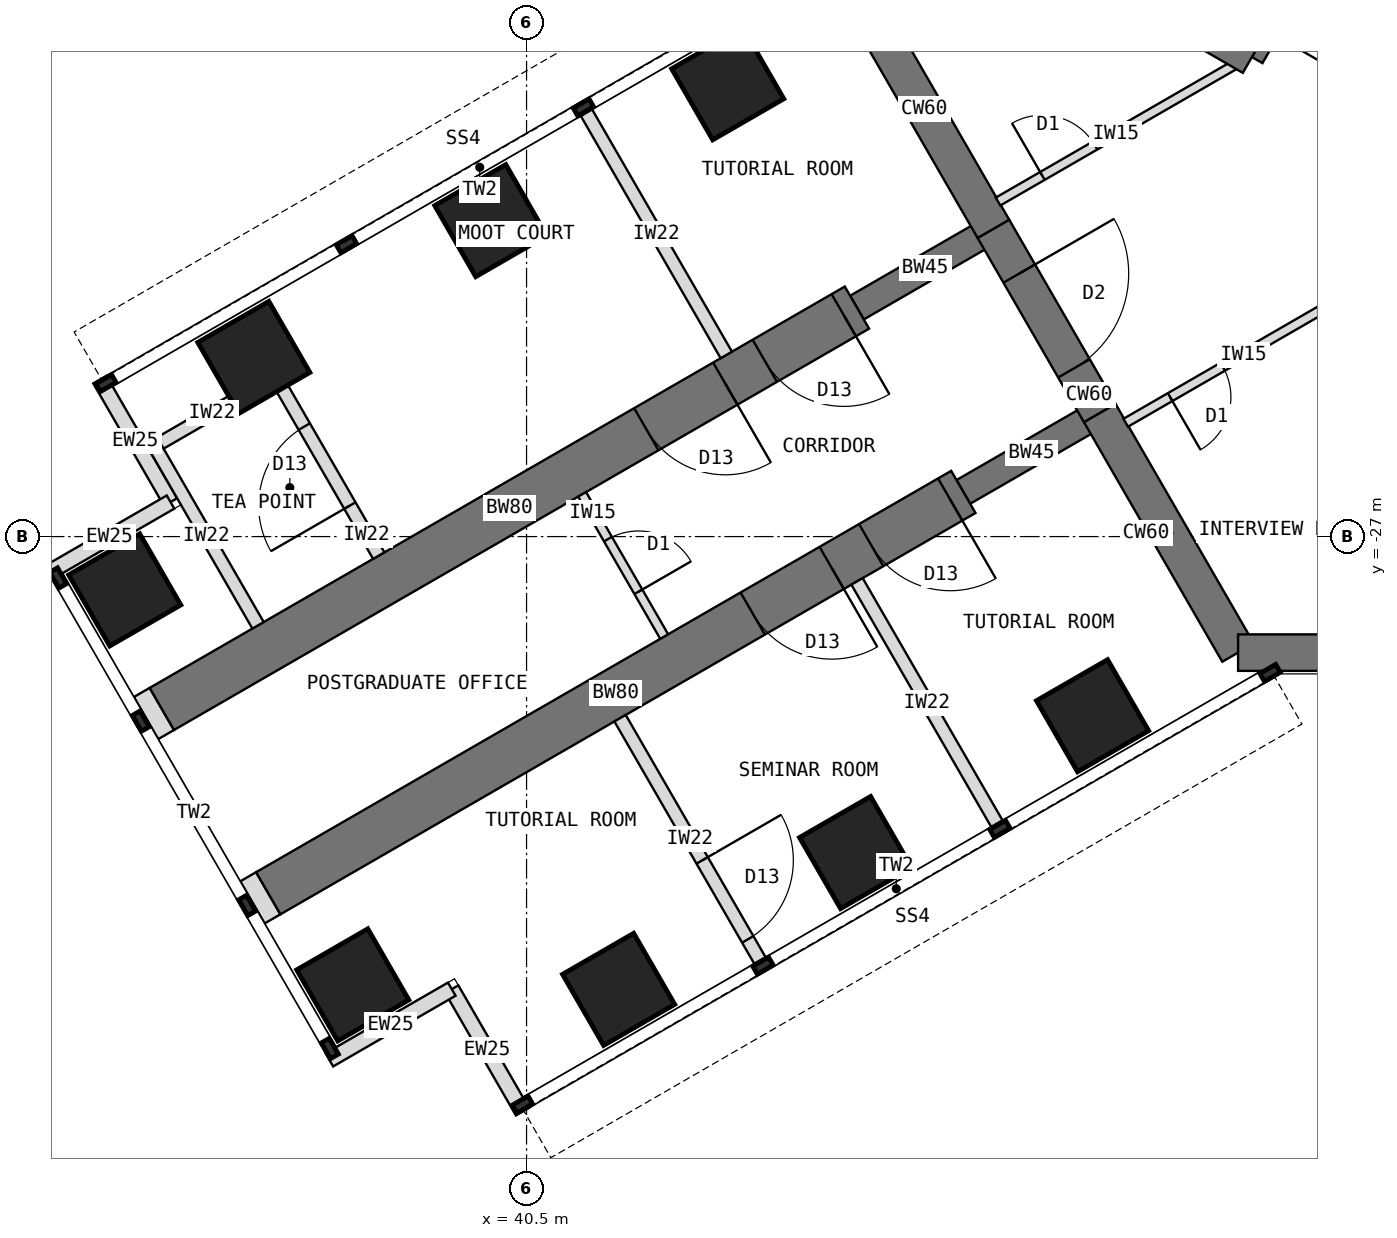
"""IFC4 building model, lengths in metres.
Left out: names, types, materials, properties, quantities, classifications, styles, units other than length and angle.
Written with IfcOpenShell. Run it as: python <this file> out.ifc"""

import sys

from ifc_helpers import new_model, si_unit, direction, frame, frame_2d, origin, origin_2d, place, context, subcontext, project, spatial, rectangle, extrude, element, fill, save


model = new_model("IFC4")
c1 = context("Model", 3, precision=1e-05, world=origin(), true_north=direction((0.0, 1.0)))
c2 = subcontext(c1, "Body", "Model", "MODEL_VIEW")
j1 = project(units=[si_unit("LENGTHUNIT", "METRE"), si_unit("PLANEANGLEUNIT", "RADIAN")], contexts=[c1])
p1 = place(None, origin())
s1 = spatial("IfcSite", under=j1, at=p1, CompositionType="ELEMENT")
p2 = place(p1, origin())
s2 = spatial("IfcBuilding", under=s1, at=p2, CompositionType="ELEMENT")
p3 = place(p2, frame((0.0, 0.0, 113.5)))
s3 = spatial("IfcBuildingStorey", under=s2, at=p3, CompositionType="ELEMENT", Elevation=113.5)
p4 = place(p3, frame((45.904, -18.0, 0.0), z_axis=(0.0, 0.0, 1.0), x_axis=(0.500024481964, -0.866011268655, 0.0)))
e1 = element("IfcWall", 1, at=p4, inside=s3, PredefinedType="SHEAR", context=c2, shape_type="SweptSolid", body=[
    extrude(rectangle(XDim=4.548, YDim=0.6, at=frame_2d((2.274, 0.0))), origin(), (0.0, 0.0, 1.0), 4.0),
])
p5 = place(p3, frame((48.178, -21.939, 0.0), z_axis=(0.0, 0.0, 1.0), x_axis=(0.500010275428, -0.866019471182, 0.0)))
e2 = element("IfcWall", 2, at=p5, inside=s3, PredefinedType="SHEAR", context=c2, shape_type="SweptSolid", body=[
    extrude(rectangle(XDim=3.5, YDim=0.6, at=frame_2d((1.75, 0.0))), origin(), (0.0, 0.0, 1.0), 4.0),
])
p6 = place(p5, frame((0.85, 0.0, 0.0)))
e3 = element("IfcOpeningElement", 3, at=p6, cuts=e2, PredefinedType="OPENING", context=c2, shape_type="SweptSolid", body=[
    extrude(rectangle(XDim=1.8, YDim=2.1, at=frame_2d((0.9, 1.05))), frame((0.0, 0.31, 0.0), z_axis=(0.0, -1.0, 0.0), x_axis=(1.0, 0.0, 0.0)), (0.0, 0.0, 1.0), 0.62),
])
p7 = place(p3, frame((49.928, -24.97, 0.0), z_axis=(0.0, 0.0, 1.0), x_axis=(0.499984222037, -0.866034513004, 0.0)))
e4 = element("IfcWall", 4, at=p7, inside=s3, PredefinedType="SHEAR", context=c2, shape_type="SweptSolid", body=[
    extrude(rectangle(XDim=4.548, YDim=0.6, at=frame_2d((2.274, 0.0))), origin(), (0.0, 0.0, 1.0), 4.0),
])
p8 = place(p3, frame((52.202, -28.908, 0.0), z_axis=(0.0, 0.0, 1.0), x_axis=(1.0, 0.0, 0.0)))
e5 = element("IfcWall", 5, at=p8, inside=s3, PredefinedType="SHEAR", context=c2, shape_type="SweptSolid", body=[
    extrude(rectangle(XDim=12.596, YDim=0.6, at=frame_2d((6.298, 0.0))), origin(), (0.0, 0.0, 1.0), 4.0),
])
p9 = place(p3, frame((49.928, -24.97, 0.0), z_axis=(0.0, 0.0, 1.0), x_axis=(-0.866031863473, -0.499988811324, 0.0)))
e6 = element("IfcWall", 6, at=p9, inside=s3, PredefinedType="SHEAR", context=c2, shape_type="SweptSolid", body=[
    extrude(rectangle(XDim=2.592, YDim=0.45, at=frame_2d((1.296, 0.0))), origin(), (0.0, 0.0, 1.0), 4.0),
])
p10 = place(p3, frame((47.684, -26.266, 0.0), z_axis=(0.0, 0.0, 1.0), x_axis=(-0.866027579429, -0.499996231654, 0.0)))
e7 = element("IfcWall", 7, at=p10, inside=s3, PredefinedType="SHEAR", context=c2, shape_type="SweptSolid", body=[
    extrude(rectangle(XDim=13.2, YDim=0.8, at=frame_2d((6.6, 0.0))), origin(), (0.0, 0.0, 1.0), 4.0),
])
p11 = place(p10, frame((0.25, 0.0, 0.0)))
e8 = element("IfcOpeningElement", 8, at=p11, cuts=e7, PredefinedType="OPENING", context=c2, shape_type="SweptSolid", body=[
    extrude(rectangle(XDim=1.5, YDim=2.1, at=frame_2d((0.75, 1.05))), frame((0.0, 0.41, 0.0), z_axis=(0.0, -1.0, 0.0), x_axis=(1.0, 0.0, 0.0)), (0.0, 0.0, 1.0), 0.82),
])
p12 = place(p10, frame((2.5, 0.0, 0.0)))
e9 = element("IfcOpeningElement", 9, at=p12, cuts=e7, PredefinedType="OPENING", context=c2, shape_type="SweptSolid", body=[
    extrude(rectangle(XDim=1.5, YDim=2.1, at=frame_2d((0.75, 1.05))), frame((0.0, 0.41, 0.0), z_axis=(0.0, -1.0, 0.0), x_axis=(1.0, 0.0, 0.0)), (0.0, 0.0, 1.0), 0.82),
])
p13 = place(p3, frame((48.178, -21.939, 0.0), z_axis=(0.0, 0.0, 1.0), x_axis=(-0.866072649678, -0.499918158782, 0.0)))
e10 = element("IfcWall", 10, at=p13, inside=s3, PredefinedType="SHEAR", context=c2, shape_type="SweptSolid", body=[
    extrude(rectangle(XDim=2.592, YDim=0.45, at=frame_2d((1.296, 0.0))), origin(), (0.0, 0.0, 1.0), 4.0),
])
p14 = place(p3, frame((45.934, -23.234, 0.0), z_axis=(0.0, 0.0, 1.0), x_axis=(-0.866019570528, -0.500010103361, 0.0)))
e11 = element("IfcWall", 11, at=p14, inside=s3, PredefinedType="SHEAR", context=c2, shape_type="SweptSolid", body=[
    extrude(rectangle(XDim=13.2, YDim=0.8, at=frame_2d((6.6, 0.0))), origin(), (0.0, 0.0, 1.0), 4.0),
])
p15 = place(p14, frame((0.25, 0.0, 0.0)))
e12 = element("IfcOpeningElement", 12, at=p15, cuts=e11, PredefinedType="OPENING", context=c2, shape_type="SweptSolid", body=[
    extrude(rectangle(XDim=1.5, YDim=2.1, at=frame_2d((0.75, 1.05))), frame((0.0, 0.41, 0.0), z_axis=(0.0, -1.0, 0.0), x_axis=(1.0, 0.0, 0.0)), (0.0, 0.0, 1.0), 0.82),
])
p16 = place(p14, frame((2.5, 0.0, 0.0)))
e13 = element("IfcOpeningElement", 13, at=p16, cuts=e11, PredefinedType="OPENING", context=c2, shape_type="SweptSolid", body=[
    extrude(rectangle(XDim=1.5, YDim=2.1, at=frame_2d((0.75, 1.05))), frame((0.0, 0.41, 0.0), z_axis=(0.0, -1.0, 0.0), x_axis=(1.0, 0.0, 0.0)), (0.0, 0.0, 1.0), 0.82),
])
for number, where, z_axis, x_axis in (
    (14, (49.809, -29.946, 0.0), (0.0, 0.0, 1.0), (0.866, 0.5, 0.0)),
    (15, (43.809, -19.554, 0.0), (0.0, 0.0, 1.0), (0.866, 0.5, 0.0)),
    (16, (45.912, -32.196, 0.0), (0.0, 0.0, 1.0), (0.866, 0.5, 0.0)),
    (17, (39.912, -21.804, 0.0), (0.0, 0.0, 1.0), (0.866, 0.5, 0.0)),
    (18, (42.014, -34.446, 0.0), (0.0, 0.0, 1.0), (0.866, 0.5, 0.0)),
    (19, (36.014, -24.054, 0.0), (0.0, 0.0, 1.0), (0.866, 0.5, 0.0)),
    (20, (37.642, -34.373, 0.0), (0.0, 0.0, 1.0), (0.866, 0.5, 0.0)),
    (21, (33.892, -27.877, 0.0), (0.0, 0.0, 1.0), (0.866, 0.5, 0.0)),
):
    element("IfcColumn", number, at=place(p3, frame(where, z_axis=z_axis, x_axis=x_axis)), inside=s3, PredefinedType="COLUMN", context=c2, shape_type="SweptSolid", body=[
        extrude(rectangle(XDim=1.35, YDim=1.35, at=origin_2d()), origin(), (0.0, 0.0, 1.0), 4.0),
    ])
for number, where, z_axis, x_axis in (
    (22, (40.433, -36.456, 0.0), (0.0, 0.0, 1.0), (-0.5, 0.866, 0.0)),
    (23, (39.27, -34.443, 0.0), (0.0, 0.0, 1.0), (-0.866, -0.5, 0.0)),
    (24, (33.483, -24.419, 0.0), (0.0, 0.0, 1.0), (0.5, -0.866, 0.0)),
    (25, (34.645, -26.432, 0.0), (0.0, 0.0, 1.0), (-0.866, -0.5, 0.0)),
):
    element("IfcWall", number, at=place(p3, frame(where, z_axis=z_axis, x_axis=x_axis)), inside=s3, PredefinedType="STANDARD", context=c2, shape_type="SweptSolid", body=[
        extrude(rectangle(XDim=2.325, YDim=0.25, at=frame_2d((1.163, 0.0))), origin(), (0.0, 0.0, 1.0), 3.8),
    ])
p17 = place(p3, frame((36.252, -32.865, 0.0), z_axis=(0.0, 0.0, 1.0), x_axis=(-0.865778900179, -0.500426713919, 0.0)))
e26 = element("IfcWall", 26, at=p17, inside=s3, PredefinedType="PARTITIONING", context=c2, shape_type="SweptSolid", body=[
    extrude(rectangle(XDim=0.3, YDim=0.8, at=frame_2d((0.15, 0.0))), origin(), (0.0, 0.0, 1.0), 3.8),
])
p18 = place(p3, frame((34.502, -29.834, 0.0), z_axis=(0.0, 0.0, 1.0), x_axis=(-0.866131372301, -0.499816412211, 0.0)))
e27 = element("IfcWall", 27, at=p18, inside=s3, PredefinedType="PARTITIONING", context=c2, shape_type="SweptSolid", body=[
    extrude(rectangle(XDim=0.3, YDim=0.8, at=frame_2d((0.15, 0.0))), origin(), (0.0, 0.0, 1.0), 3.8),
])
p19 = place(p3, frame((56.516, -12.236, 0.0), z_axis=(0.0, 0.0, 1.0), x_axis=(-0.49999894854, -0.866026010844, 0.0)))
e28 = element("IfcWall", 28, at=p19, inside=s3, PredefinedType="SHEAR", context=c2, shape_type="SweptSolid", body=[
    extrude(rectangle(XDim=8.0, YDim=0.2, at=frame_2d((4.0, 0.0))), origin(), (0.0, 0.0, 1.0), 4.0),
])
p20 = place(p19, frame((6.3, 0.0, 0.0)))
e29 = element("IfcOpeningElement", 29, at=p20, cuts=e28, PredefinedType="OPENING", context=c2, shape_type="SweptSolid", body=[
    extrude(rectangle(XDim=1.2, YDim=2.1, at=frame_2d((0.6, 1.05))), frame((0.0, 0.11, 0.0), z_axis=(0.0, -1.0, 0.0), x_axis=(1.0, 0.0, 0.0)), (0.0, 0.0, 1.0), 0.22),
])
p21 = place(p3, frame((52.38, -19.201, 0.0), z_axis=(0.0, 0.0, 1.0), x_axis=(-0.866027317282, 0.49999668571, 0.0)))
e30 = element("IfcWall", 30, at=p21, inside=s3, PredefinedType="SHEAR", context=c2, shape_type="SweptSolid", body=[
    extrude(rectangle(XDim=5.908, YDim=0.4, at=frame_2d((2.954, 0.0))), origin(), (0.0, 0.0, 1.0), 4.0),
])
p22 = place(p3, frame((45.935, -27.737, 0.0), z_axis=(0.0, 0.0, 1.0), x_axis=(0.500014953309, -0.866016770315, 0.0)))
e31 = element("IfcWall", 31, at=p22, inside=s3, PredefinedType="PARTITIONING", context=c2, shape_type="SweptSolid", body=[
    extrude(rectangle(XDim=4.6, YDim=0.215, at=frame_2d((2.3, 0.0))), origin(), (0.0, 0.0, 1.0), 3.8),
])
p23 = place(p3, frame((42.038, -29.987, 0.0), z_axis=(0.0, 0.0, 1.0), x_axis=(0.499975146636, -0.866039752405, 0.0)))
e32 = element("IfcWall", 32, at=p23, inside=s3, PredefinedType="PARTITIONING", context=c2, shape_type="SweptSolid", body=[
    extrude(rectangle(XDim=4.6, YDim=0.215, at=frame_2d((2.3, 0.0))), origin(), (0.0, 0.0, 1.0), 3.8),
])
p24 = place(p23, frame((2.7, 0.0, 0.0)))
e33 = element("IfcOpeningElement", 33, at=p24, cuts=e32, PredefinedType="OPENING", context=c2, shape_type="SweptSolid", body=[
    extrude(rectangle(XDim=1.5, YDim=2.1, at=frame_2d((0.75, 1.05))), frame((0.0, 0.117, 0.0), z_axis=(0.0, -1.0, 0.0), x_axis=(1.0, 0.0, 0.0)), (0.0, 0.0, 1.0), 0.235),
])
p25 = place(p3, frame((43.785, -24.013, 0.0), z_axis=(0.0, 0.0, 1.0), x_axis=(-0.500014953309, 0.866016770315, 0.0)))
e34 = element("IfcWall", 34, at=p25, inside=s3, PredefinedType="PARTITIONING", context=c2, shape_type="SweptSolid", body=[
    extrude(rectangle(XDim=4.6, YDim=0.215, at=frame_2d((2.3, 0.0))), origin(), (0.0, 0.0, 1.0), 3.8),
])
p26 = place(p3, frame((36.369, -24.369, 0.0), z_axis=(0.0, 0.0, 1.0), x_axis=(-0.866050077142, -0.499957262057, 0.0)))
e35 = element("IfcWall", 35, at=p26, inside=s3, PredefinedType="PARTITIONING", context=c2, shape_type="SweptSolid", body=[
    extrude(rectangle(XDim=2.4, YDim=0.215, at=frame_2d((1.2, 0.0))), origin(), (0.0, 0.0, 1.0), 3.8),
])
p27 = place(p3, frame((38.069, -27.313, 0.0), z_axis=(0.0, 0.0, 1.0), x_axis=(-0.500008388397, 0.866020560687, 0.0)))
e36 = element("IfcWall", 36, at=p27, inside=s3, PredefinedType="PARTITIONING", context=c2, shape_type="SweptSolid", body=[
    extrude(rectangle(XDim=3.4, YDim=0.215, at=frame_2d((1.7, 0.0))), origin(), (0.0, 0.0, 1.0), 3.8),
])
p28 = place(p27, frame((0.95, 0.0, 0.0)))
e37 = element("IfcOpeningElement", 37, at=p28, cuts=e36, PredefinedType="OPENING", context=c2, shape_type="SweptSolid", body=[
    extrude(rectangle(XDim=1.5, YDim=2.1, at=frame_2d((0.75, 1.05))), frame((0.0, 0.117, 0.0), z_axis=(0.0, -1.0, 0.0), x_axis=(1.0, 0.0, 0.0)), (0.0, 0.0, 1.0), 0.235),
])
p29 = place(p3, frame((36.084, -28.459, 0.0), z_axis=(0.0, 0.0, 1.0), x_axis=(-0.500008388397, 0.866020560687, 0.0)))
e38 = element("IfcWall", 38, at=p29, inside=s3, PredefinedType="PARTITIONING", context=c2, shape_type="SweptSolid", body=[
    extrude(rectangle(XDim=3.4, YDim=0.215, at=frame_2d((1.7, 0.0))), origin(), (0.0, 0.0, 1.0), 3.8),
])
p30 = place(p3, frame((48.254, -21.49, 0.0), z_axis=(0.0, 0.0, 1.0), x_axis=(0.866025707867, 0.499999473313, 0.0)))
e39 = element("IfcWall", 39, at=p30, inside=s3, PredefinedType="PARTITIONING", context=c2, shape_type="SweptSolid", body=[
    extrude(rectangle(XDim=4.476, YDim=0.15, at=frame_2d((2.238, 0.0))), origin(), (0.0, 0.0, 1.0), 3.8),
])
p31 = place(p30, frame((0.843, 0.0, 0.0)))
e40 = element("IfcOpeningElement", 40, at=p31, cuts=e39, PredefinedType="OPENING", context=c2, shape_type="SweptSolid", body=[
    extrude(rectangle(XDim=1.0, YDim=2.1, at=frame_2d((0.5, 1.05))), frame((0.0, 0.085, 0.0), z_axis=(0.0, -1.0, 0.0), x_axis=(1.0, 0.0, 0.0)), (0.0, 0.0, 1.0), 0.17),
])
p32 = place(p3, frame((54.23, -22.89, 0.0), z_axis=(0.0, 0.0, 1.0), x_axis=(-0.866025707867, -0.499999473313, 0.0)))
e41 = element("IfcWall", 41, at=p32, inside=s3, PredefinedType="PARTITIONING", context=c2, shape_type="SweptSolid", body=[
    extrude(rectangle(XDim=4.476, YDim=0.15, at=frame_2d((2.238, 0.0))), origin(), (0.0, 0.0, 1.0), 3.8),
])
p33 = place(p32, frame((2.633, 0.0, 0.0)))
e42 = element("IfcOpeningElement", 42, at=p33, cuts=e41, PredefinedType="OPENING", context=c2, shape_type="SweptSolid", body=[
    extrude(rectangle(XDim=1.0, YDim=2.1, at=frame_2d((0.5, 1.05))), frame((0.0, 0.085, 0.0), z_axis=(0.0, -1.0, 0.0), x_axis=(1.0, 0.0, 0.0)), (0.0, 0.0, 1.0), 0.17),
])
p34 = place(p3, frame((41.414, -26.306, 0.0), z_axis=(0.0, 0.0, 1.0), x_axis=(0.500048589285, -0.86599734893, 0.0)))
e43 = element("IfcWall", 43, at=p34, inside=s3, PredefinedType="PARTITIONING", context=c2, shape_type="SweptSolid", body=[
    extrude(rectangle(XDim=2.7, YDim=0.15, at=frame_2d((1.35, 0.0))), origin(), (0.0, 0.0, 1.0), 3.8),
])
p35 = place(p34, frame((0.85, 0.0, 0.0)))
e44 = element("IfcOpeningElement", 44, at=p35, cuts=e43, PredefinedType="OPENING", context=c2, shape_type="SweptSolid", body=[
    extrude(rectangle(XDim=1.0, YDim=2.1, at=frame_2d((0.5, 1.05))), frame((0.0, 0.085, 0.0), z_axis=(0.0, -1.0, 0.0), x_axis=(1.0, 0.0, 0.0)), (0.0, 0.0, 1.0), 0.17),
])
p36 = place(p6, origin())
e45 = element("IfcDoor", 45, at=p36, inside=s3, OperationType="DOUBLE_DOOR_DOUBLE_SWING", PredefinedType="DOOR", context=c2, shape_type="SweptSolid", body=[
    extrude(rectangle(XDim=1.72, YDim=2.06, at=frame_2d((0.9, 1.03))), frame((0.0, 0.025, 0.0), z_axis=(0.0, -1.0, 0.0), x_axis=(1.0, 0.0, 0.0)), (0.0, 0.0, 1.0), 0.05),
    extrude(rectangle(XDim=0.04, YDim=2.1, at=frame_2d((0.02, 1.05))), frame((0.0, 0.3, 0.0), z_axis=(0.0, -1.0, 0.0), x_axis=(1.0, 0.0, 0.0)), (0.0, 0.0, 1.0), 0.6),
    extrude(rectangle(XDim=0.04, YDim=2.1, at=frame_2d((1.78, 1.05))), frame((0.0, 0.3, 0.0), z_axis=(0.0, -1.0, 0.0), x_axis=(1.0, 0.0, 0.0)), (0.0, 0.0, 1.0), 0.6),
    extrude(rectangle(XDim=1.72, YDim=0.04, at=frame_2d((0.9, 2.08))), frame((0.0, 0.3, 0.0), z_axis=(0.0, -1.0, 0.0), x_axis=(1.0, 0.0, 0.0)), (0.0, 0.0, 1.0), 0.6),
])
fill(e3, e45)
p37 = place(p24, origin())
e46 = element("IfcDoor", 46, at=p37, inside=s3, OperationType="DOUBLE_DOOR_SINGLE_SWING", PredefinedType="DOOR", context=c2, shape_type="SweptSolid", body=[
    extrude(rectangle(XDim=1.5, YDim=2.1, at=frame_2d((0.75, 1.05))), frame((0.0, 0.025, 0.0), z_axis=(0.0, -1.0, 0.0), x_axis=(1.0, 0.0, 0.0)), (0.0, 0.0, 1.0), 0.05),
])
fill(e33, e46)
p38 = place(p28, origin())
e47 = element("IfcDoor", 47, at=p38, inside=s3, OperationType="DOUBLE_DOOR_SINGLE_SWING", PredefinedType="DOOR", context=c2, shape_type="SweptSolid", body=[
    extrude(rectangle(XDim=1.5, YDim=2.1, at=frame_2d((0.75, 1.05))), frame((0.0, 0.025, 0.0), z_axis=(0.0, -1.0, 0.0), x_axis=(1.0, 0.0, 0.0)), (0.0, 0.0, 1.0), 0.05),
])
fill(e37, e47)
p39 = place(p31, origin())
e48 = element("IfcDoor", 48, at=p39, inside=s3, OperationType="SINGLE_SWING_LEFT", PredefinedType="DOOR", context=c2, shape_type="SweptSolid", body=[
    extrude(rectangle(XDim=1.0, YDim=2.1, at=frame_2d((0.5, 1.05))), frame((0.0, 0.025, 0.0), z_axis=(0.0, -1.0, 0.0), x_axis=(1.0, 0.0, 0.0)), (0.0, 0.0, 1.0), 0.05),
])
fill(e40, e48)
p40 = place(p33, origin())
e49 = element("IfcDoor", 49, at=p40, inside=s3, OperationType="SINGLE_SWING_RIGHT", PredefinedType="DOOR", context=c2, shape_type="SweptSolid", body=[
    extrude(rectangle(XDim=1.0, YDim=2.1, at=frame_2d((0.5, 1.05))), frame((0.0, 0.025, 0.0), z_axis=(0.0, -1.0, 0.0), x_axis=(1.0, 0.0, 0.0)), (0.0, 0.0, 1.0), 0.05),
])
fill(e42, e49)
p41 = place(p35, origin())
e50 = element("IfcDoor", 50, at=p41, inside=s3, OperationType="SINGLE_SWING_RIGHT", PredefinedType="DOOR", context=c2, shape_type="SweptSolid", body=[
    extrude(rectangle(XDim=1.0, YDim=2.1, at=frame_2d((0.5, 1.05))), frame((0.0, 0.025, 0.0), z_axis=(0.0, -1.0, 0.0), x_axis=(1.0, 0.0, 0.0)), (0.0, 0.0, 1.0), 0.05),
])
fill(e44, e50)
p42 = place(p11, origin())
e51 = element("IfcDoor", 51, at=p42, inside=s3, OperationType="DOUBLE_DOOR_SINGLE_SWING", PredefinedType="DOOR", context=c2, shape_type="SweptSolid", body=[
    extrude(rectangle(XDim=1.42, YDim=2.06, at=frame_2d((0.75, 1.03))), frame((0.0, 0.025, 0.0), z_axis=(0.0, -1.0, 0.0), x_axis=(1.0, 0.0, 0.0)), (0.0, 0.0, 1.0), 0.05),
    extrude(rectangle(XDim=0.04, YDim=2.1, at=frame_2d((0.02, 1.05))), frame((0.0, 0.4, 0.0), z_axis=(0.0, -1.0, 0.0), x_axis=(1.0, 0.0, 0.0)), (0.0, 0.0, 1.0), 0.8),
    extrude(rectangle(XDim=0.04, YDim=2.1, at=frame_2d((1.48, 1.05))), frame((0.0, 0.4, 0.0), z_axis=(0.0, -1.0, 0.0), x_axis=(1.0, 0.0, 0.0)), (0.0, 0.0, 1.0), 0.8),
    extrude(rectangle(XDim=1.42, YDim=0.04, at=frame_2d((0.75, 2.08))), frame((0.0, 0.4, 0.0), z_axis=(0.0, -1.0, 0.0), x_axis=(1.0, 0.0, 0.0)), (0.0, 0.0, 1.0), 0.8),
])
fill(e8, e51)
p43 = place(p12, origin())
e52 = element("IfcDoor", 52, at=p43, inside=s3, OperationType="DOUBLE_DOOR_SINGLE_SWING", PredefinedType="DOOR", context=c2, shape_type="SweptSolid", body=[
    extrude(rectangle(XDim=1.42, YDim=2.06, at=frame_2d((0.75, 1.03))), frame((0.0, 0.025, 0.0), z_axis=(0.0, -1.0, 0.0), x_axis=(1.0, 0.0, 0.0)), (0.0, 0.0, 1.0), 0.05),
    extrude(rectangle(XDim=0.04, YDim=2.1, at=frame_2d((0.02, 1.05))), frame((0.0, 0.4, 0.0), z_axis=(0.0, -1.0, 0.0), x_axis=(1.0, 0.0, 0.0)), (0.0, 0.0, 1.0), 0.8),
    extrude(rectangle(XDim=0.04, YDim=2.1, at=frame_2d((1.48, 1.05))), frame((0.0, 0.4, 0.0), z_axis=(0.0, -1.0, 0.0), x_axis=(1.0, 0.0, 0.0)), (0.0, 0.0, 1.0), 0.8),
    extrude(rectangle(XDim=1.42, YDim=0.04, at=frame_2d((0.75, 2.08))), frame((0.0, 0.4, 0.0), z_axis=(0.0, -1.0, 0.0), x_axis=(1.0, 0.0, 0.0)), (0.0, 0.0, 1.0), 0.8),
])
fill(e9, e52)
p44 = place(p15, origin())
e53 = element("IfcDoor", 53, at=p44, inside=s3, OperationType="DOUBLE_DOOR_SINGLE_SWING", PredefinedType="DOOR", context=c2, shape_type="SweptSolid", body=[
    extrude(rectangle(XDim=1.42, YDim=2.06, at=frame_2d((0.75, 1.03))), frame((0.0, 0.025, 0.0), z_axis=(0.0, -1.0, 0.0), x_axis=(1.0, 0.0, 0.0)), (0.0, 0.0, 1.0), 0.05),
    extrude(rectangle(XDim=0.04, YDim=2.1, at=frame_2d((0.02, 1.05))), frame((0.0, 0.4, 0.0), z_axis=(0.0, -1.0, 0.0), x_axis=(1.0, 0.0, 0.0)), (0.0, 0.0, 1.0), 0.8),
    extrude(rectangle(XDim=0.04, YDim=2.1, at=frame_2d((1.48, 1.05))), frame((0.0, 0.4, 0.0), z_axis=(0.0, -1.0, 0.0), x_axis=(1.0, 0.0, 0.0)), (0.0, 0.0, 1.0), 0.8),
    extrude(rectangle(XDim=1.42, YDim=0.04, at=frame_2d((0.75, 2.08))), frame((0.0, 0.4, 0.0), z_axis=(0.0, -1.0, 0.0), x_axis=(1.0, 0.0, 0.0)), (0.0, 0.0, 1.0), 0.8),
])
fill(e12, e53)
p45 = place(p16, origin())
e54 = element("IfcDoor", 54, at=p45, inside=s3, OperationType="DOUBLE_DOOR_SINGLE_SWING", PredefinedType="DOOR", context=c2, shape_type="SweptSolid", body=[
    extrude(rectangle(XDim=1.42, YDim=2.06, at=frame_2d((0.75, 1.03))), frame((0.0, 0.025, 0.0), z_axis=(0.0, -1.0, 0.0), x_axis=(1.0, 0.0, 0.0)), (0.0, 0.0, 1.0), 0.05),
    extrude(rectangle(XDim=0.04, YDim=2.1, at=frame_2d((0.02, 1.05))), frame((0.0, 0.4, 0.0), z_axis=(0.0, -1.0, 0.0), x_axis=(1.0, 0.0, 0.0)), (0.0, 0.0, 1.0), 0.8),
    extrude(rectangle(XDim=0.04, YDim=2.1, at=frame_2d((1.48, 1.05))), frame((0.0, 0.4, 0.0), z_axis=(0.0, -1.0, 0.0), x_axis=(1.0, 0.0, 0.0)), (0.0, 0.0, 1.0), 0.8),
    extrude(rectangle(XDim=1.42, YDim=0.04, at=frame_2d((0.75, 2.08))), frame((0.0, 0.4, 0.0), z_axis=(0.0, -1.0, 0.0), x_axis=(1.0, 0.0, 0.0)), (0.0, 0.0, 1.0), 0.8),
])
fill(e13, e54)
save(model, sys.argv[1])
